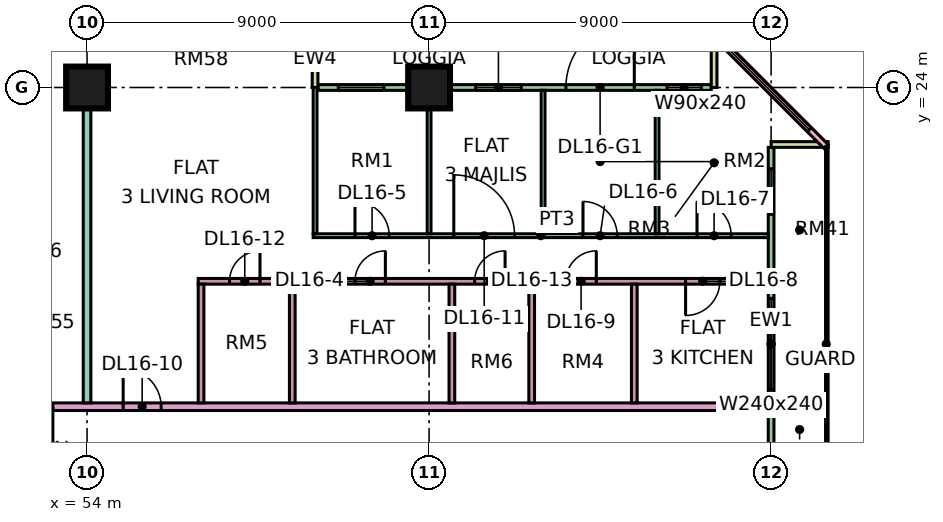
"""IFC4 building model, lengths in metres.
Left out: names, types, materials, properties, quantities, classifications, styles, units other than length and angle.
Written with IfcOpenShell. Run it as: python <this file> out.ifc"""

import sys

from ifc_helpers import new_model, si_unit, direction, frame, frame_2d, origin, origin_2d, place, context, subcontext, project, spatial, rectangle, extrude, element, fill, save


model = new_model("IFC4")
c1 = context("Model", 3, precision=1e-05, world=origin(), true_north=direction((0.0, 1.0)))
c2 = subcontext(c1, "Body", "Model", "MODEL_VIEW")
j1 = project(units=[si_unit("LENGTHUNIT", "METRE"), si_unit("PLANEANGLEUNIT", "RADIAN")], contexts=[c1])
p1 = place(None, origin())
s1 = spatial("IfcSite", under=j1, at=p1, CompositionType="ELEMENT")
p2 = place(p1, origin())
s2 = spatial("IfcBuilding", under=s1, at=p2, CompositionType="ELEMENT")
p3 = place(p2, frame((0.0, 0.0, 75.15)))
s3 = spatial("IfcBuildingStorey", under=s2, at=p3, CompositionType="ELEMENT", Elevation=75.15)
for number, where, z_axis, x_axis in (
    (1, (54.0, 24.0, 0.0), (0.0, 0.0, 1.0), (1.0, 0.0, 0.0)),
    (2, (63.0, 24.0, 0.0), (0.0, 0.0, 1.0), (1.0, 0.0, 0.0)),
):
    element("IfcColumn", number, at=place(p3, frame(where, z_axis=z_axis, x_axis=x_axis)), inside=s3, PredefinedType="COLUMN", context=c2, shape_type="SweptSolid", body=[
        extrude(rectangle(XDim=1.1, YDim=1.1, at=origin_2d()), origin(), (0.0, 0.0, 1.0), 3.75),
    ])
p4 = place(p3, frame((70.425, 24.0, 0.0), z_axis=(0.0, 0.0, 1.0), x_axis=(-1.0, 0.0, 0.0)))
e3 = element("IfcWall", 3, at=p4, inside=s3, PredefinedType="SOLIDWALL", context=c2, shape_type="SweptSolid", body=[
    extrude(rectangle(XDim=10.35, YDim=0.15, at=frame_2d((5.175, 0.0))), origin(), (0.0, 0.0, 1.0), 3.35),
])
p5 = place(p4, frame((0.262, 0.0, 0.45)))
e4 = element("IfcOpeningElement", 4, at=p5, cuts=e3, PredefinedType="OPENING", context=c2, shape_type="SweptSolid", body=[
    extrude(rectangle(XDim=0.9, YDim=2.4, at=frame_2d((0.45, 1.2))), frame((0.0, 0.085, 0.0), z_axis=(0.0, -1.0, 0.0), x_axis=(1.0, 0.0, 0.0)), (0.0, 0.0, 1.0), 0.17),
])
p6 = place(p4, frame((2.025, 0.0, 0.0)))
e5 = element("IfcOpeningElement", 5, at=p6, cuts=e3, PredefinedType="OPENING", context=c2, shape_type="SweptSolid", body=[
    extrude(rectangle(XDim=1.8, YDim=2.4, at=frame_2d((0.9, 1.2))), frame((0.0, 0.085, 0.0), z_axis=(0.0, -1.0, 0.0), x_axis=(1.0, 0.0, 0.0)), (0.0, 0.0, 1.0), 0.17),
])
p7 = place(p4, frame((5.0, 0.0, 0.45)))
e6 = element("IfcOpeningElement", 6, at=p7, cuts=e3, PredefinedType="OPENING", context=c2, shape_type="SweptSolid", body=[
    extrude(rectangle(XDim=1.2, YDim=2.4, at=frame_2d((0.6, 1.2))), frame((0.0, 0.085, 0.0), z_axis=(0.0, -1.0, 0.0), x_axis=(1.0, 0.0, 0.0)), (0.0, 0.0, 1.0), 0.17),
])
p8 = place(p4, frame((8.613, 0.0, 0.45)))
e7 = element("IfcOpeningElement", 7, at=p8, cuts=e3, PredefinedType="OPENING", context=c2, shape_type="SweptSolid", body=[
    extrude(rectangle(XDim=1.2, YDim=2.4, at=frame_2d((0.6, 1.2))), frame((0.0, 0.085, 0.0), z_axis=(0.0, -1.0, 0.0), x_axis=(1.0, 0.0, 0.0)), (0.0, 0.0, 1.0), 0.17),
])
for number, where, z_axis, x_axis in (
    (8, (70.5, 25.5, 0.0), (0.0, 0.0, 1.0), (0.0, -1.0, 0.0)),
    (9, (60.0, 25.5, 0.0), (0.0, 0.0, 1.0), (0.0, -1.0, 0.0)),
):
    element("IfcWall", number, at=place(p3, frame(where, z_axis=z_axis, x_axis=x_axis)), inside=s3, PredefinedType="SOLIDWALL", context=c2, shape_type="SweptSolid", body=[
        extrude(rectangle(XDim=1.5, YDim=0.15, at=frame_2d((0.75, 0.0))), origin(), (0.0, 0.0, 1.0), 3.35),
    ])
p9 = place(p3, frame((72.0, 12.075, 0.0), z_axis=(0.0, 0.0, 1.0), x_axis=(0.0, 1.0, 0.0)))
e10 = element("IfcWall", 10, at=p9, inside=s3, PredefinedType="SOLIDWALL", context=c2, shape_type="SweptSolid", body=[
    extrude(rectangle(XDim=10.35, YDim=0.15, at=frame_2d((5.175, 0.0))), origin(), (0.0, 0.0, 1.0), 3.35),
])
p10 = place(p9, frame((3.975, 0.0, 0.45)))
e11 = element("IfcOpeningElement", 11, at=p10, cuts=e10, PredefinedType="OPENING", context=c2, shape_type="SweptSolid", body=[
    extrude(rectangle(XDim=2.4, YDim=2.4, at=frame_2d((1.2, 1.2))), frame((0.0, 0.085, 0.0), z_axis=(0.0, -1.0, 0.0), x_axis=(1.0, 0.0, 0.0)), (0.0, 0.0, 1.0), 0.17),
])
p11 = place(p9, frame((8.587, 0.0, 0.45)))
e12 = element("IfcOpeningElement", 12, at=p11, cuts=e10, PredefinedType="OPENING", context=c2, shape_type="SweptSolid", body=[
    extrude(rectangle(XDim=1.2, YDim=2.4, at=frame_2d((0.6, 1.2))), frame((0.0, 0.085, 0.0), z_axis=(0.0, -1.0, 0.0), x_axis=(1.0, 0.0, 0.0)), (0.0, 0.0, 1.0), 0.17),
])
p12 = place(p3, frame((73.5, 22.5, 0.0), z_axis=(0.0, 0.0, 1.0), x_axis=(-1.0, 0.0, 0.0)))
e13 = element("IfcWall", 13, at=p12, inside=s3, PredefinedType="SOLIDWALL", context=c2, shape_type="SweptSolid", body=[
    extrude(rectangle(XDim=1.5, YDim=0.15, at=frame_2d((0.75, 0.0))), origin(), (0.0, 0.0, 1.0), 3.35),
])
p13 = place(p3, frame((73.447, 22.447, 0.0), z_axis=(0.0, 0.0, 1.0), x_axis=(-0.707106781187, 0.707106781187, 0.0)))
e14 = element("IfcWall", 14, at=p13, inside=s3, PredefinedType="SOLIDWALL", context=c2, shape_type="SweptSolid", body=[
    extrude(rectangle(XDim=4.243, YDim=0.15, at=frame_2d((2.121, 0.0))), origin(), (0.0, 0.0, 1.0), 3.35),
])
p14 = place(p13, frame((0.621, 0.0, 0.45)))
e15 = element("IfcOpeningElement", 15, at=p14, cuts=e14, PredefinedType="OPENING", context=c2, shape_type="SweptSolid", body=[
    extrude(rectangle(XDim=3.0, YDim=2.4, at=frame_2d((1.5, 1.2))), frame((0.0, 0.085, 0.0), z_axis=(0.0, -1.0, 0.0), x_axis=(1.0, 0.0, 0.0)), (0.0, 0.0, 1.0), 0.17),
])
p15 = place(p3, frame((51.225, 15.6, 0.0), z_axis=(0.0, 0.0, 1.0), x_axis=(1.0, 0.0, 0.0)))
e16 = element("IfcWall", 16, at=p15, inside=s3, PredefinedType="PARTITIONING", context=c2, shape_type="SweptSolid", body=[
    extrude(rectangle(XDim=20.701, YDim=0.2, at=frame_2d((10.351, 0.0))), origin(), (0.0, 0.0, 1.0), 3.35),
])
p16 = place(p15, frame((3.725, 0.0, 0.0)))
e17 = element("IfcOpeningElement", 17, at=p16, cuts=e16, PredefinedType="OPENING", context=c2, shape_type="SweptSolid", body=[
    extrude(rectangle(XDim=1.0, YDim=2.1, at=frame_2d((0.5, 1.05))), frame((0.0, 0.11, 0.0), z_axis=(0.0, -1.0, 0.0), x_axis=(1.0, 0.0, 0.0)), (0.0, 0.0, 1.0), 0.22),
])
p17 = place(p15, frame((0.875, 0.0, 0.0)))
e18 = element("IfcOpeningElement", 18, at=p17, cuts=e16, PredefinedType="OPENING", context=c2, shape_type="SweptSolid", body=[
    extrude(rectangle(XDim=1.0, YDim=2.1, at=frame_2d((0.5, 1.05))), frame((0.0, 0.11, 0.0), z_axis=(0.0, -1.0, 0.0), x_axis=(1.0, 0.0, 0.0)), (0.0, 0.0, 1.0), 0.22),
])
p18 = place(p3, frame((54.0, 15.7, 0.0), z_axis=(0.0, 0.0, 1.0), x_axis=(0.0, 1.0, 0.0)))
e19 = element("IfcWall", 19, at=p18, inside=s3, PredefinedType="PARTITIONING", context=c2, shape_type="SweptSolid", body=[
    extrude(rectangle(XDim=8.3, YDim=0.2, at=frame_2d((4.15, 0.0))), origin(), (0.0, 0.0, 1.0), 3.35),
])
p19 = place(p3, frame((56.925, 18.9, 0.0), z_axis=(0.0, 0.0, 1.0), x_axis=(1.0, 0.0, 0.0)))
e20 = element("IfcWall", 20, at=p19, inside=s3, PredefinedType="PARTITIONING", context=c2, shape_type="SweptSolid", body=[
    extrude(rectangle(XDim=15.001, YDim=0.15, at=frame_2d((7.5, 0.0))), origin(), (0.0, 0.0, 1.0), 3.35),
])
p20 = place(p19, frame((4.125, 0.0, 0.0)))
e21 = element("IfcOpeningElement", 21, at=p20, cuts=e20, PredefinedType="OPENING", context=c2, shape_type="SweptSolid", body=[
    extrude(rectangle(XDim=0.8, YDim=2.1, at=frame_2d((0.4, 1.05))), frame((0.0, 0.085, 0.0), z_axis=(0.0, -1.0, 0.0), x_axis=(1.0, 0.0, 0.0)), (0.0, 0.0, 1.0), 0.17),
])
p21 = place(p19, frame((12.825, 0.0, 0.0)))
e22 = element("IfcOpeningElement", 22, at=p21, cuts=e20, PredefinedType="OPENING", context=c2, shape_type="SweptSolid", body=[
    extrude(rectangle(XDim=0.9, YDim=2.1, at=frame_2d((0.45, 1.05))), frame((0.0, 0.085, 0.0), z_axis=(0.0, -1.0, 0.0), x_axis=(1.0, 0.0, 0.0)), (0.0, 0.0, 1.0), 0.17),
])
p22 = place(p19, frame((9.675, 0.0, 0.0)))
e23 = element("IfcOpeningElement", 23, at=p22, cuts=e20, PredefinedType="OPENING", context=c2, shape_type="SweptSolid", body=[
    extrude(rectangle(XDim=0.8, YDim=2.1, at=frame_2d((0.4, 1.05))), frame((0.0, 0.085, 0.0), z_axis=(0.0, -1.0, 0.0), x_axis=(1.0, 0.0, 0.0)), (0.0, 0.0, 1.0), 0.17),
])
p23 = place(p19, frame((0.825, 0.0, 0.0)))
e24 = element("IfcOpeningElement", 24, at=p23, cuts=e20, PredefinedType="OPENING", context=c2, shape_type="SweptSolid", body=[
    extrude(rectangle(XDim=0.8, YDim=2.1, at=frame_2d((0.4, 1.05))), frame((0.0, 0.085, 0.0), z_axis=(0.0, -1.0, 0.0), x_axis=(1.0, 0.0, 0.0)), (0.0, 0.0, 1.0), 0.17),
])
p24 = place(p19, frame((7.275, 0.0, 0.0)))
e25 = element("IfcOpeningElement", 25, at=p24, cuts=e20, PredefinedType="OPENING", context=c2, shape_type="SweptSolid", body=[
    extrude(rectangle(XDim=0.8, YDim=2.1, at=frame_2d((0.4, 1.05))), frame((0.0, 0.085, 0.0), z_axis=(0.0, -1.0, 0.0), x_axis=(1.0, 0.0, 0.0)), (0.0, 0.0, 1.0), 0.17),
])
for number, where, z_axis, x_axis in (
    (26, (57.0, 15.7, 0.0), (0.0, 0.0, 1.0), (0.0, 1.0, 0.0)),
    (27, (59.4, 15.7, 0.0), (0.0, 0.0, 1.0), (0.0, 1.0, 0.0)),
):
    element("IfcWall", number, at=place(p3, frame(where, z_axis=z_axis, x_axis=x_axis)), inside=s3, PredefinedType="PARTITIONING", context=c2, shape_type="SweptSolid", body=[
        extrude(rectangle(XDim=3.125, YDim=0.15, at=frame_2d((1.562, 0.0))), origin(), (0.0, 0.0, 1.0), 3.35),
    ])
p25 = place(p3, frame((59.95, 20.1, 0.0), z_axis=(0.0, 0.0, 1.0), x_axis=(1.0, 0.0, 0.0)))
e28 = element("IfcWall", 28, at=p25, inside=s3, PredefinedType="PARTITIONING", context=c2, shape_type="SweptSolid", body=[
    extrude(rectangle(XDim=11.976, YDim=0.1, at=frame_2d((5.988, 0.0))), origin(), (0.0, 0.0, 1.0), 3.35),
])
p26 = place(p25, frame((1.1, 0.0, 0.0)))
e29 = element("IfcOpeningElement", 29, at=p26, cuts=e28, PredefinedType="OPENING", context=c2, shape_type="SweptSolid", body=[
    extrude(rectangle(XDim=0.9, YDim=2.1, at=frame_2d((0.45, 1.05))), frame((0.0, 0.06, 0.0), z_axis=(0.0, -1.0, 0.0), x_axis=(1.0, 0.0, 0.0)), (0.0, 0.0, 1.0), 0.12),
])
p27 = place(p25, frame((7.1, 0.0, 0.0)))
e30 = element("IfcOpeningElement", 30, at=p27, cuts=e28, PredefinedType="OPENING", context=c2, shape_type="SweptSolid", body=[
    extrude(rectangle(XDim=0.9, YDim=2.1, at=frame_2d((0.45, 1.05))), frame((0.0, 0.06, 0.0), z_axis=(0.0, -1.0, 0.0), x_axis=(1.0, 0.0, 0.0)), (0.0, 0.0, 1.0), 0.12),
])
p28 = place(p25, frame((10.1, 0.0, 0.0)))
e31 = element("IfcOpeningElement", 31, at=p28, cuts=e28, PredefinedType="OPENING", context=c2, shape_type="SweptSolid", body=[
    extrude(rectangle(XDim=0.9, YDim=2.1, at=frame_2d((0.45, 1.05))), frame((0.0, 0.06, 0.0), z_axis=(0.0, -1.0, 0.0), x_axis=(1.0, 0.0, 0.0)), (0.0, 0.0, 1.0), 0.12),
])
p29 = place(p25, frame((3.7, 0.0, 0.0)))
e32 = element("IfcOpeningElement", 32, at=p29, cuts=e28, PredefinedType="OPENING", context=c2, shape_type="SweptSolid", body=[
    extrude(rectangle(XDim=1.6, YDim=2.1, at=frame_2d((0.8, 1.05))), frame((0.0, 0.06, 0.0), z_axis=(0.0, -1.0, 0.0), x_axis=(1.0, 0.0, 0.0)), (0.0, 0.0, 1.0), 0.12),
])
p30 = place(p3, frame((60.0, 20.15, 0.0), z_axis=(0.0, 0.0, 1.0), x_axis=(0.0, 1.0, 0.0)))
e33 = element("IfcWall", 33, at=p30, inside=s3, PredefinedType="PARTITIONING", context=c2, shape_type="SweptSolid", body=[
    extrude(rectangle(XDim=3.85, YDim=0.1, at=frame_2d((1.925, 0.0))), origin(), (0.0, 0.0, 1.0), 3.35),
])
p31 = place(p3, frame((63.0, 20.15, 0.0), z_axis=(0.0, 0.0, 1.0), x_axis=(0.0, 1.0, 0.0)))
e34 = element("IfcWall", 34, at=p31, inside=s3, PredefinedType="PARTITIONING", context=c2, shape_type="SweptSolid", body=[
    extrude(rectangle(XDim=3.776, YDim=0.1, at=frame_2d((1.888, 0.0))), origin(), (0.0, 0.0, 1.0), 3.35),
])
for number, where, z_axis, x_axis in (
    (35, (63.6, 15.7, 0.0), (0.0, 0.0, 1.0), (0.0, 1.0, 0.0)),
    (36, (65.7, 15.7, 0.0), (0.0, 0.0, 1.0), (0.0, 1.0, 0.0)),
):
    element("IfcWall", number, at=place(p3, frame(where, z_axis=z_axis, x_axis=x_axis)), inside=s3, PredefinedType="PARTITIONING", context=c2, shape_type="SweptSolid", body=[
        extrude(rectangle(XDim=3.125, YDim=0.15, at=frame_2d((1.562, 0.0))), origin(), (0.0, 0.0, 1.0), 3.35),
    ])
p32 = place(p3, frame((66.0, 20.15, 0.0), z_axis=(0.0, 0.0, 1.0), x_axis=(0.0, 1.0, 0.0)))
e37 = element("IfcWall", 37, at=p32, inside=s3, PredefinedType="PARTITIONING", context=c2, shape_type="SweptSolid", body=[
    extrude(rectangle(XDim=3.776, YDim=0.1, at=frame_2d((1.888, 0.0))), origin(), (0.0, 0.0, 1.0), 3.35),
])
p33 = place(p3, frame((68.4, 15.7, 0.0), z_axis=(0.0, 0.0, 1.0), x_axis=(0.0, 1.0, 0.0)))
e38 = element("IfcWall", 38, at=p33, inside=s3, PredefinedType="PARTITIONING", context=c2, shape_type="SweptSolid", body=[
    extrude(rectangle(XDim=3.125, YDim=0.15, at=frame_2d((1.562, 0.0))), origin(), (0.0, 0.0, 1.0), 3.35),
])
p34 = place(p3, frame((69.0, 20.15, 0.0), z_axis=(0.0, 0.0, 1.0), x_axis=(0.0, 1.0, 0.0)))
e39 = element("IfcWall", 39, at=p34, inside=s3, PredefinedType="PARTITIONING", context=c2, shape_type="SweptSolid", body=[
    extrude(rectangle(XDim=3.776, YDim=0.1, at=frame_2d((1.888, 0.0))), origin(), (0.0, 0.0, 1.0), 3.35),
])
p35 = place(p5, origin())
e40 = element("IfcWindow", 40, at=p35, inside=s3, PartitioningType="SINGLE_PANEL", PredefinedType="WINDOW", context=c2, shape_type="SweptSolid", body=[
    extrude(rectangle(XDim=0.9, YDim=2.4, at=frame_2d((0.45, 1.2))), frame((0.0, 0.03, 0.0), z_axis=(0.0, -1.0, 0.0), x_axis=(1.0, 0.0, 0.0)), (0.0, 0.0, 1.0), 0.06),
])
fill(e4, e40)
p36 = place(p6, frame((1.8, 0.0, 0.0), z_axis=(0.0, 0.0, 1.0), x_axis=(-1.0, 0.0, 0.0)))
e41 = element("IfcDoor", 41, at=p36, inside=s3, OperationType="DOUBLE_DOOR_SINGLE_SWING", PredefinedType="DOOR", context=c2, shape_type="SweptSolid", body=[
    extrude(rectangle(XDim=1.8, YDim=2.4, at=frame_2d((0.9, 1.2))), frame((0.0, 0.025, 0.0), z_axis=(0.0, -1.0, 0.0), x_axis=(1.0, 0.0, 0.0)), (0.0, 0.0, 1.0), 0.05),
])
fill(e5, e41)
p37 = place(p7, origin())
e42 = element("IfcWindow", 42, at=p37, inside=s3, PartitioningType="SINGLE_PANEL", PredefinedType="WINDOW", context=c2, shape_type="SweptSolid", body=[
    extrude(rectangle(XDim=1.2, YDim=2.4, at=frame_2d((0.6, 1.2))), frame((0.0, 0.03, 0.0), z_axis=(0.0, -1.0, 0.0), x_axis=(1.0, 0.0, 0.0)), (0.0, 0.0, 1.0), 0.06),
])
fill(e6, e42)
p38 = place(p8, origin())
e43 = element("IfcWindow", 43, at=p38, inside=s3, PartitioningType="SINGLE_PANEL", PredefinedType="WINDOW", context=c2, shape_type="SweptSolid", body=[
    extrude(rectangle(XDim=1.2, YDim=2.4, at=frame_2d((0.6, 1.2))), frame((0.0, 0.03, 0.0), z_axis=(0.0, -1.0, 0.0), x_axis=(1.0, 0.0, 0.0)), (0.0, 0.0, 1.0), 0.06),
])
fill(e7, e43)
p39 = place(p10, origin())
e44 = element("IfcWindow", 44, at=p39, inside=s3, PartitioningType="SINGLE_PANEL", PredefinedType="WINDOW", context=c2, shape_type="SweptSolid", body=[
    extrude(rectangle(XDim=2.4, YDim=2.4, at=frame_2d((1.2, 1.2))), frame((0.0, 0.03, 0.0), z_axis=(0.0, -1.0, 0.0), x_axis=(1.0, 0.0, 0.0)), (0.0, 0.0, 1.0), 0.06),
])
fill(e11, e44)
p40 = place(p11, origin())
e45 = element("IfcWindow", 45, at=p40, inside=s3, PartitioningType="SINGLE_PANEL", PredefinedType="WINDOW", context=c2, shape_type="SweptSolid", body=[
    extrude(rectangle(XDim=1.2, YDim=2.4, at=frame_2d((0.6, 1.2))), frame((0.0, 0.03, 0.0), z_axis=(0.0, -1.0, 0.0), x_axis=(1.0, 0.0, 0.0)), (0.0, 0.0, 1.0), 0.06),
])
fill(e12, e45)
p41 = place(p14, origin())
e46 = element("IfcWindow", 46, at=p41, inside=s3, PartitioningType="SINGLE_PANEL", PredefinedType="WINDOW", context=c2, shape_type="SweptSolid", body=[
    extrude(rectangle(XDim=3.0, YDim=2.4, at=frame_2d((1.5, 1.2))), frame((0.0, 0.03, 0.0), z_axis=(0.0, -1.0, 0.0), x_axis=(1.0, 0.0, 0.0)), (0.0, 0.0, 1.0), 0.06),
])
fill(e15, e46)
p42 = place(p20, frame((0.8, 0.0, 0.0), z_axis=(0.0, 0.0, 1.0), x_axis=(-1.0, 0.0, 0.0)))
e47 = element("IfcDoor", 47, at=p42, inside=s3, OperationType="SINGLE_SWING_RIGHT", PredefinedType="DOOR", context=c2, shape_type="SweptSolid", body=[
    extrude(rectangle(XDim=0.8, YDim=2.1, at=frame_2d((0.4, 1.05))), frame((0.0, 0.025, 0.0), z_axis=(0.0, -1.0, 0.0), x_axis=(1.0, 0.0, 0.0)), (0.0, 0.0, 1.0), 0.05),
])
fill(e21, e47)
p43 = place(p26, origin())
e48 = element("IfcDoor", 48, at=p43, inside=s3, OperationType="SINGLE_SWING_LEFT", PredefinedType="DOOR", context=c2, shape_type="SweptSolid", body=[
    extrude(rectangle(XDim=0.9, YDim=2.1, at=frame_2d((0.45, 1.05))), frame((0.0, 0.025, 0.0), z_axis=(0.0, -1.0, 0.0), x_axis=(1.0, 0.0, 0.0)), (0.0, 0.0, 1.0), 0.05),
])
fill(e29, e48)
p44 = place(p27, origin())
e49 = element("IfcDoor", 49, at=p44, inside=s3, OperationType="SINGLE_SWING_LEFT", PredefinedType="DOOR", context=c2, shape_type="SweptSolid", body=[
    extrude(rectangle(XDim=0.9, YDim=2.1, at=frame_2d((0.45, 1.05))), frame((0.0, 0.025, 0.0), z_axis=(0.0, -1.0, 0.0), x_axis=(1.0, 0.0, 0.0)), (0.0, 0.0, 1.0), 0.05),
])
fill(e30, e49)
p45 = place(p28, origin())
e50 = element("IfcDoor", 50, at=p45, inside=s3, OperationType="SINGLE_SWING_LEFT", PredefinedType="DOOR", context=c2, shape_type="SweptSolid", body=[
    extrude(rectangle(XDim=0.9, YDim=2.1, at=frame_2d((0.45, 1.05))), frame((0.0, 0.025, 0.0), z_axis=(0.0, -1.0, 0.0), x_axis=(1.0, 0.0, 0.0)), (0.0, 0.0, 1.0), 0.05),
])
fill(e31, e50)
p46 = place(p21, frame((0.9, 0.0, 0.0), z_axis=(0.0, 0.0, 1.0), x_axis=(-1.0, 0.0, 0.0)))
e51 = element("IfcDoor", 51, at=p46, inside=s3, OperationType="SINGLE_SWING_LEFT", PredefinedType="DOOR", context=c2, shape_type="SweptSolid", body=[
    extrude(rectangle(XDim=0.9, YDim=2.1, at=frame_2d((0.45, 1.05))), frame((0.0, 0.025, 0.0), z_axis=(0.0, -1.0, 0.0), x_axis=(1.0, 0.0, 0.0)), (0.0, 0.0, 1.0), 0.05),
])
fill(e22, e51)
p47 = place(p22, frame((0.8, 0.0, 0.0), z_axis=(0.0, 0.0, 1.0), x_axis=(-1.0, 0.0, 0.0)))
e52 = element("IfcDoor", 52, at=p47, inside=s3, OperationType="SINGLE_SWING_RIGHT", PredefinedType="DOOR", context=c2, shape_type="SweptSolid", body=[
    extrude(rectangle(XDim=0.8, YDim=2.1, at=frame_2d((0.4, 1.05))), frame((0.0, 0.025, 0.0), z_axis=(0.0, -1.0, 0.0), x_axis=(1.0, 0.0, 0.0)), (0.0, 0.0, 1.0), 0.05),
])
fill(e23, e52)
p48 = place(p16, origin())
e53 = element("IfcDoor", 53, at=p48, inside=s3, OperationType="SINGLE_SWING_LEFT", PredefinedType="DOOR", context=c2, shape_type="SweptSolid", body=[
    extrude(rectangle(XDim=1.0, YDim=2.1, at=frame_2d((0.5, 1.05))), frame((0.0, 0.025, 0.0), z_axis=(0.0, -1.0, 0.0), x_axis=(1.0, 0.0, 0.0)), (0.0, 0.0, 1.0), 0.05),
])
fill(e17, e53)
p49 = place(p29, origin())
e54 = element("IfcDoor", 54, at=p49, inside=s3, OperationType="DOUBLE_DOOR_SINGLE_SWING", PredefinedType="DOOR", context=c2, shape_type="SweptSolid", body=[
    extrude(rectangle(XDim=1.6, YDim=2.1, at=frame_2d((0.8, 1.05))), frame((0.0, 0.025, 0.0), z_axis=(0.0, -1.0, 0.0), x_axis=(1.0, 0.0, 0.0)), (0.0, 0.0, 1.0), 0.05),
])
fill(e32, e54)
p50 = place(p23, frame((0.8, 0.0, 0.0), z_axis=(0.0, 0.0, 1.0), x_axis=(-1.0, 0.0, 0.0)))
e55 = element("IfcDoor", 55, at=p50, inside=s3, OperationType="SINGLE_SWING_RIGHT", PredefinedType="DOOR", context=c2, shape_type="SweptSolid", body=[
    extrude(rectangle(XDim=0.8, YDim=2.1, at=frame_2d((0.4, 1.05))), frame((0.0, 0.025, 0.0), z_axis=(0.0, -1.0, 0.0), x_axis=(1.0, 0.0, 0.0)), (0.0, 0.0, 1.0), 0.05),
])
fill(e24, e55)
p51 = place(p24, frame((0.8, 0.0, 0.0), z_axis=(0.0, 0.0, 1.0), x_axis=(-1.0, 0.0, 0.0)))
e56 = element("IfcDoor", 56, at=p51, inside=s3, OperationType="SINGLE_SWING_RIGHT", PredefinedType="DOOR", context=c2, shape_type="SweptSolid", body=[
    extrude(rectangle(XDim=0.8, YDim=2.1, at=frame_2d((0.4, 1.05))), frame((0.0, 0.025, 0.0), z_axis=(0.0, -1.0, 0.0), x_axis=(1.0, 0.0, 0.0)), (0.0, 0.0, 1.0), 0.05),
])
fill(e25, e56)
p52 = place(p17, origin())
e57 = element("IfcDoor", 57, at=p52, inside=s3, OperationType="SINGLE_SWING_RIGHT", PredefinedType="DOOR", context=c2, shape_type="SweptSolid", body=[
    extrude(rectangle(XDim=1.0, YDim=2.1, at=frame_2d((0.5, 1.05))), frame((0.0, 0.025, 0.0), z_axis=(0.0, -1.0, 0.0), x_axis=(1.0, 0.0, 0.0)), (0.0, 0.0, 1.0), 0.05),
])
fill(e18, e57)
save(model, sys.argv[1])
